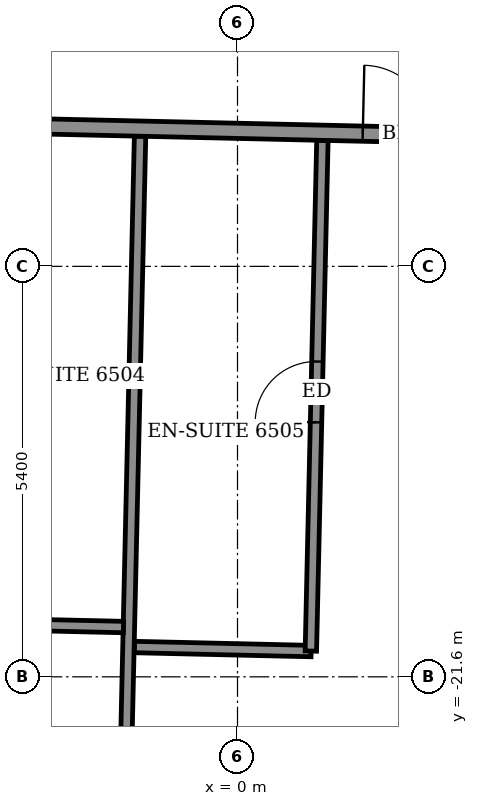
"""IFC4 building model, lengths in metres.
Left out: names, types, materials, properties, quantities, classifications, styles, units other than length and angle.
Written with IfcOpenShell. Run it as: python <this file> out.ifc"""

import sys

from ifc_helpers import new_model, si_unit, direction, frame, frame_2d, origin, place, context, subcontext, project, spatial, rectangle, extrude, element, fill, save


model = new_model("IFC4")
c1 = context("Model", 3, precision=1e-05, world=origin(), true_north=direction((0.0, 1.0)))
c2 = subcontext(c1, "Body", "Model", "MODEL_VIEW")
j1 = project(units=[si_unit("LENGTHUNIT", "METRE"), si_unit("PLANEANGLEUNIT", "RADIAN")], contexts=[c1])
p1 = place(None, origin())
s1 = spatial("IfcSite", under=j1, at=p1, CompositionType="ELEMENT")
p2 = place(p1, origin())
s2 = spatial("IfcBuilding", under=s1, at=p2, CompositionType="ELEMENT")
p3 = place(p2, frame((0.0, 0.0, 257.3)))
s3 = spatial("IfcBuildingStorey", under=s2, at=p3, CompositionType="ELEMENT", Elevation=257.3)
p4 = place(p3, frame((-1.557, -26.585, 0.0), z_axis=(0.0, 0.0, 1.0), x_axis=(0.022719113715, 0.999741887625, 0.0)))
e1 = element("IfcWall", 1, at=p4, inside=s3, PredefinedType="PARTITIONING", context=c2, shape_type="SweptSolid", body=[
    extrude(rectangle(XDim=12.1, YDim=0.15, at=frame_2d((6.05, 0.0))), origin(), (0.0, 0.0, 1.0), 2.55),
])
p5 = place(p3, frame((-1.355, -21.208, 0.0), z_axis=(0.0, 0.0, 1.0), x_axis=(0.999740260747, -0.02279059109, 0.0)))
e2 = element("IfcWall", 2, at=p5, inside=s3, PredefinedType="PARTITIONING", context=c2, shape_type="SweptSolid", body=[
    extrude(rectangle(XDim=2.324, YDim=0.15, at=frame_2d((1.162, 0.0))), origin(), (0.0, 0.0, 1.0), 3.05),
])
p6 = place(p3, frame((0.965, -21.261, 0.0), z_axis=(0.0, 0.0, 1.0), x_axis=(0.022595152847, 0.999744696944, 0.0)))
e3 = element("IfcWall", 3, at=p6, inside=s3, PredefinedType="PARTITIONING", context=c2, shape_type="SweptSolid", body=[
    extrude(rectangle(XDim=6.721, YDim=0.15, at=frame_2d((3.36, 0.0))), origin(), (0.0, 0.0, 1.0), 3.05),
])
p7 = place(p6, frame((3.01, 0.0, 0.0)))
e4 = element("IfcOpeningElement", 4, at=p7, cuts=e3, PredefinedType="OPENING", context=c2, shape_type="SweptSolid", body=[
    extrude(rectangle(XDim=0.8, YDim=2.1, at=frame_2d((0.4, 1.05))), frame((0.0, 0.085, 0.0), z_axis=(0.0, -1.0, 0.0), x_axis=(1.0, 0.0, 0.0)), (0.0, 0.0, 1.0), 0.17),
])
p8 = place(p3, frame((-3.824, -20.892, 0.0), z_axis=(0.0, 0.0, 1.0), x_axis=(0.999740260747, -0.02279059109, 0.0)))
e5 = element("IfcWall", 5, at=p8, inside=s3, PredefinedType="PARTITIONING", context=c2, shape_type="SweptSolid", body=[
    extrude(rectangle(XDim=2.324, YDim=0.15, at=frame_2d((1.162, 0.0))), origin(), (0.0, 0.0, 1.0), 3.05),
])
p9 = place(p3, frame((-25.12, -13.847, 0.0), z_axis=(0.0, 0.0, 1.0), x_axis=(0.999742852445, -0.022676617578, 0.0)))
e6 = element("IfcWall", 6, at=p9, inside=s3, PredefinedType="PARTITIONING", context=c2, shape_type="SweptSolid", body=[
    extrude(rectangle(XDim=52.873, YDim=0.2, at=frame_2d((26.437, 0.0))), origin(), (0.0, 0.0, 1.0), 3.05),
])
p10 = place(p9, frame((0.725, 0.0, 0.0)))
e7 = element("IfcOpeningElement", 7, at=p10, cuts=e6, PredefinedType="OPENING", context=c2, shape_type="SweptSolid", body=[
    extrude(rectangle(XDim=1.0, YDim=2.1, at=frame_2d((0.5, 1.05))), frame((0.0, 0.11, 0.0), z_axis=(0.0, -1.0, 0.0), x_axis=(1.0, 0.0, 0.0)), (0.0, 0.0, 1.0), 0.22),
])
p11 = place(p9, frame((5.1, 0.0, 0.0)))
e8 = element("IfcOpeningElement", 8, at=p11, cuts=e6, PredefinedType="OPENING", context=c2, shape_type="SweptSolid", body=[
    extrude(rectangle(XDim=0.9, YDim=2.1, at=frame_2d((0.45, 1.05))), frame((0.0, 0.11, 0.0), z_axis=(0.0, -1.0, 0.0), x_axis=(1.0, 0.0, 0.0)), (0.0, 0.0, 1.0), 0.22),
])
p12 = place(p9, frame((9.6, 0.0, 0.0)))
e9 = element("IfcOpeningElement", 9, at=p12, cuts=e6, PredefinedType="OPENING", context=c2, shape_type="SweptSolid", body=[
    extrude(rectangle(XDim=0.9, YDim=2.1, at=frame_2d((0.45, 1.05))), frame((0.0, 0.11, 0.0), z_axis=(0.0, -1.0, 0.0), x_axis=(1.0, 0.0, 0.0)), (0.0, 0.0, 1.0), 0.22),
])
p13 = place(p9, frame((11.45, 0.0, 0.0)))
e10 = element("IfcOpeningElement", 10, at=p13, cuts=e6, PredefinedType="OPENING", context=c2, shape_type="SweptSolid", body=[
    extrude(rectangle(XDim=0.9, YDim=2.1, at=frame_2d((0.45, 1.05))), frame((0.0, 0.11, 0.0), z_axis=(0.0, -1.0, 0.0), x_axis=(1.0, 0.0, 0.0)), (0.0, 0.0, 1.0), 0.22),
])
p14 = place(p9, frame((18.15, 0.0, 0.0)))
e11 = element("IfcOpeningElement", 11, at=p14, cuts=e6, PredefinedType="OPENING", context=c2, shape_type="SweptSolid", body=[
    extrude(rectangle(XDim=0.9, YDim=2.1, at=frame_2d((0.45, 1.05))), frame((0.0, 0.11, 0.0), z_axis=(0.0, -1.0, 0.0), x_axis=(1.0, 0.0, 0.0)), (0.0, 0.0, 1.0), 0.22),
])
p15 = place(p9, frame((20.05, 0.0, 0.0)))
e12 = element("IfcOpeningElement", 12, at=p15, cuts=e6, PredefinedType="OPENING", context=c2, shape_type="SweptSolid", body=[
    extrude(rectangle(XDim=0.9, YDim=2.1, at=frame_2d((0.45, 1.05))), frame((0.0, 0.11, 0.0), z_axis=(0.0, -1.0, 0.0), x_axis=(1.0, 0.0, 0.0)), (0.0, 0.0, 1.0), 0.22),
])
p16 = place(p9, frame((26.775, 0.0, 0.0)))
e13 = element("IfcOpeningElement", 13, at=p16, cuts=e6, PredefinedType="OPENING", context=c2, shape_type="SweptSolid", body=[
    extrude(rectangle(XDim=0.9, YDim=2.1, at=frame_2d((0.45, 1.05))), frame((0.0, 0.11, 0.0), z_axis=(0.0, -1.0, 0.0), x_axis=(1.0, 0.0, 0.0)), (0.0, 0.0, 1.0), 0.22),
])
p17 = place(p9, frame((28.675, 0.0, 0.0)))
e14 = element("IfcOpeningElement", 14, at=p17, cuts=e6, PredefinedType="OPENING", context=c2, shape_type="SweptSolid", body=[
    extrude(rectangle(XDim=0.9, YDim=2.1, at=frame_2d((0.45, 1.05))), frame((0.0, 0.11, 0.0), z_axis=(0.0, -1.0, 0.0), x_axis=(1.0, 0.0, 0.0)), (0.0, 0.0, 1.0), 0.22),
])
p18 = place(p9, frame((35.35, 0.0, 0.0)))
e15 = element("IfcOpeningElement", 15, at=p18, cuts=e6, PredefinedType="OPENING", context=c2, shape_type="SweptSolid", body=[
    extrude(rectangle(XDim=0.9, YDim=2.1, at=frame_2d((0.45, 1.05))), frame((0.0, 0.11, 0.0), z_axis=(0.0, -1.0, 0.0), x_axis=(1.0, 0.0, 0.0)), (0.0, 0.0, 1.0), 0.22),
])
p19 = place(p9, frame((37.225, 0.0, 0.0)))
e16 = element("IfcOpeningElement", 16, at=p19, cuts=e6, PredefinedType="OPENING", context=c2, shape_type="SweptSolid", body=[
    extrude(rectangle(XDim=0.9, YDim=2.1, at=frame_2d((0.45, 1.05))), frame((0.0, 0.11, 0.0), z_axis=(0.0, -1.0, 0.0), x_axis=(1.0, 0.0, 0.0)), (0.0, 0.0, 1.0), 0.22),
])
p20 = place(p9, frame((43.85, 0.0, 0.0)))
e17 = element("IfcOpeningElement", 17, at=p20, cuts=e6, PredefinedType="OPENING", context=c2, shape_type="SweptSolid", body=[
    extrude(rectangle(XDim=0.9, YDim=2.1, at=frame_2d((0.45, 1.05))), frame((0.0, 0.11, 0.0), z_axis=(0.0, -1.0, 0.0), x_axis=(1.0, 0.0, 0.0)), (0.0, 0.0, 1.0), 0.22),
])
p21 = place(p9, frame((50.786, 0.0, 0.0)))
e18 = element("IfcOpeningElement", 18, at=p21, cuts=e6, PredefinedType="OPENING", context=c2, shape_type="SweptSolid", body=[
    extrude(rectangle(XDim=1.0, YDim=2.1, at=frame_2d((0.5, 1.05))), frame((0.0, 0.11, 0.0), z_axis=(0.0, -1.0, 0.0), x_axis=(1.0, 0.0, 0.0)), (0.0, 0.0, 1.0), 0.22),
])
p22 = place(p9, frame((46.05, 0.0, 0.0)))
e19 = element("IfcOpeningElement", 19, at=p22, cuts=e6, PredefinedType="OPENING", context=c2, shape_type="SweptSolid", body=[
    extrude(rectangle(XDim=0.9, YDim=2.1, at=frame_2d((0.45, 1.05))), frame((0.0, 0.11, 0.0), z_axis=(0.0, -1.0, 0.0), x_axis=(1.0, 0.0, 0.0)), (0.0, 0.0, 1.0), 0.22),
])
p23 = place(p16, origin())
e20 = element("IfcDoor", 20, at=p23, inside=s3, OperationType="SINGLE_SWING_LEFT", PredefinedType="DOOR", context=c2, shape_type="SweptSolid", body=[
    extrude(rectangle(XDim=0.9, YDim=2.1, at=frame_2d((0.45, 1.05))), frame((0.0, 0.025, 0.0), z_axis=(0.0, -1.0, 0.0), x_axis=(1.0, 0.0, 0.0)), (0.0, 0.0, 1.0), 0.05),
])
fill(e13, e20)
p24 = place(p7, origin())
e21 = element("IfcDoor", 21, at=p24, inside=s3, OperationType="SINGLE_SWING_LEFT", PredefinedType="DOOR", context=c2, shape_type="SweptSolid", body=[
    extrude(rectangle(XDim=0.8, YDim=2.1, at=frame_2d((0.4, 1.05))), frame((0.0, 0.025, 0.0), z_axis=(0.0, -1.0, 0.0), x_axis=(1.0, 0.0, 0.0)), (0.0, 0.0, 1.0), 0.05),
])
fill(e4, e21)
save(model, sys.argv[1])
